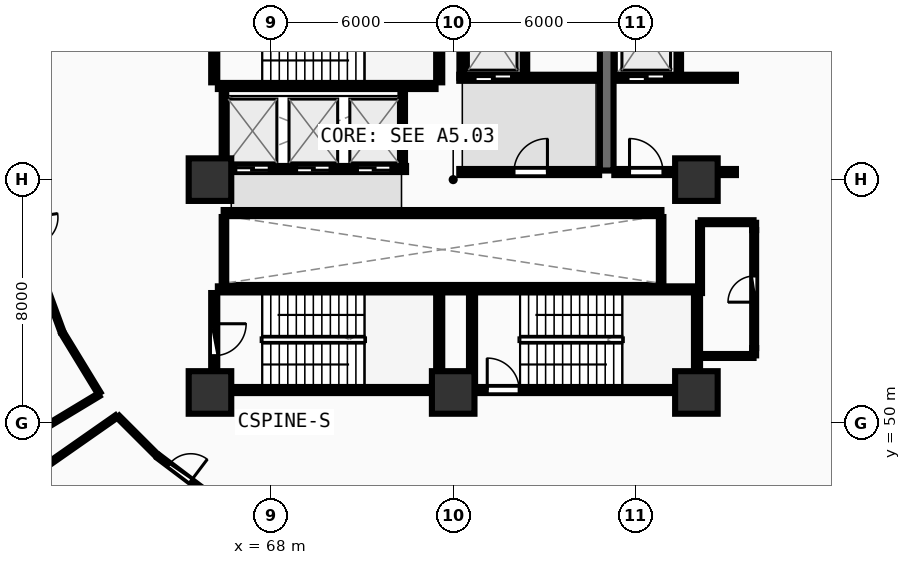
"""IFC4 building model, lengths in metres.
Left out: names, types, materials, properties, quantities, classifications, styles, units other than length and angle.
Written with IfcOpenShell. Run it as: python <this file> out.ifc"""

import sys

from ifc_helpers import new_model, si_unit, direction, frame, frame_2d, origin, origin_2d, place, context, subcontext, project, spatial, rectangle, extrude, element, fill, save


model = new_model("IFC4")
c1 = context("Model", 3, precision=1e-05, world=origin(), true_north=direction((0.0, 1.0)))
c2 = subcontext(c1, "Body", "Model", "MODEL_VIEW")
j1 = project(units=[si_unit("LENGTHUNIT", "METRE"), si_unit("PLANEANGLEUNIT", "RADIAN")], contexts=[c1])
p1 = place(None, origin())
s1 = spatial("IfcSite", under=j1, at=p1, CompositionType="ELEMENT")
p2 = place(p1, origin())
s2 = spatial("IfcBuilding", under=s1, at=p2, CompositionType="ELEMENT")
p3 = place(p2, frame((0.0, 0.0, 9.0)))
s3 = spatial("IfcBuildingStorey", under=s2, at=p3, CompositionType="ELEMENT", Elevation=9.0)
for number, where, z_axis, x_axis in (
    (1, (66.0, 51.0, 0.0), (0.0, 0.0, 1.0), (1.0, 0.0, 0.0)),
    (2, (74.0, 51.0, 0.0), (0.0, 0.0, 1.0), (1.0, 0.0, 0.0)),
    (3, (82.0, 51.0, 0.0), (0.0, 0.0, 1.0), (1.0, 0.0, 0.0)),
    (4, (82.0, 58.0, 0.0), (0.0, 0.0, 1.0), (1.0, 0.0, 0.0)),
    (5, (66.0, 58.0, 0.0), (0.0, 0.0, 1.0), (1.0, 0.0, 0.0)),
):
    element("IfcColumn", number, at=place(p3, frame(where, z_axis=z_axis, x_axis=x_axis)), inside=s3, PredefinedType="PILASTER", context=c2, shape_type="SweptSolid", body=[
        extrude(rectangle(XDim=1.4, YDim=1.4, at=origin_2d()), origin(), (0.0, 0.0, 1.0), 4.5),
    ])
p4 = place(p3, frame((66.26, 61.08, 0.0), z_axis=(0.0, 0.0, 1.0), x_axis=(1.0, 0.0, 0.0)))
e6 = element("IfcWall", 6, at=p4, inside=s3, PredefinedType="SHEAR", context=c2, shape_type="SweptSolid", body=[
    extrude(rectangle(XDim=7.16, YDim=0.2, at=frame_2d((3.58, 0.0))), origin(), (0.0, 0.0, 1.0), 4.1),
])
p5 = place(p3, frame((73.54, 61.2, 0.0), z_axis=(0.0, 0.0, 1.0), x_axis=(0.0, 1.0, 0.0)))
e7 = element("IfcWall", 7, at=p5, inside=s3, PredefinedType="SHEAR", context=c2, shape_type="SweptSolid", body=[
    extrude(rectangle(XDim=3.07, YDim=0.2, at=frame_2d((1.535, 0.0))), origin(), (0.0, 0.0, 1.0), 4.1),
])
p6 = place(p3, frame((66.14, 64.27, 0.0), z_axis=(0.0, 0.0, 1.0), x_axis=(0.0, -1.0, 0.0)))
e8 = element("IfcWall", 8, at=p6, inside=s3, PredefinedType="SHEAR", context=c2, shape_type="SweptSolid", body=[
    extrude(rectangle(XDim=3.07, YDim=0.2, at=frame_2d((1.535, 0.0))), origin(), (0.0, 0.0, 1.0), 4.1),
])
p7 = place(p6, frame((1.01, 0.0, 0.0)))
e9 = element("IfcOpeningElement", 9, at=p7, cuts=e8, PredefinedType="OPENING", context=c2, shape_type="SweptSolid", body=[
    extrude(rectangle(XDim=1.05, YDim=2.1, at=frame_2d((0.525, 1.05))), frame((0.0, 0.11, 0.0), z_axis=(0.0, -1.0, 0.0), x_axis=(1.0, 0.0, 0.0)), (0.0, 0.0, 1.0), 0.22),
])
p8 = place(p3, frame((74.0, 51.08, 0.0), z_axis=(0.0, 0.0, 1.0), x_axis=(1.0, 0.0, 0.0)))
e10 = element("IfcWall", 10, at=p8, inside=s3, PredefinedType="SHEAR", context=c2, shape_type="SweptSolid", body=[
    extrude(rectangle(XDim=7.9, YDim=0.2, at=frame_2d((3.95, 0.0))), origin(), (0.0, 0.0, 1.0), 4.1),
])
p9 = place(p8, frame((1.12, 0.0, 0.0)))
e11 = element("IfcOpeningElement", 11, at=p9, cuts=e10, PredefinedType="OPENING", context=c2, shape_type="SweptSolid", body=[
    extrude(rectangle(XDim=1.05, YDim=2.1, at=frame_2d((0.525, 1.05))), frame((0.0, 0.11, 0.0), z_axis=(0.0, -1.0, 0.0), x_axis=(1.0, 0.0, 0.0)), (0.0, 0.0, 1.0), 0.22),
])
p10 = place(p3, frame((82.02, 51.2, 0.0), z_axis=(0.0, 0.0, 1.0), x_axis=(0.0, 1.0, 0.0)))
e12 = element("IfcWall", 12, at=p10, inside=s3, PredefinedType="SHEAR", context=c2, shape_type="SweptSolid", body=[
    extrude(rectangle(XDim=3.07, YDim=0.2, at=frame_2d((1.535, 0.0))), origin(), (0.0, 0.0, 1.0), 4.1),
])
p11 = place(p3, frame((81.9, 54.39, 0.0), z_axis=(0.0, 0.0, 1.0), x_axis=(-1.0, 0.0, 0.0)))
e13 = element("IfcWall", 13, at=p11, inside=s3, PredefinedType="SHEAR", context=c2, shape_type="SweptSolid", body=[
    extrude(rectangle(XDim=8.46, YDim=0.2, at=frame_2d((4.23, 0.0))), origin(), (0.0, 0.0, 1.0), 4.1),
])
p12 = place(p3, frame((74.62, 54.27, 0.0), z_axis=(0.0, 0.0, 1.0), x_axis=(0.0, -1.0, 0.0)))
e14 = element("IfcWall", 14, at=p12, inside=s3, PredefinedType="SHEAR", context=c2, shape_type="SweptSolid", body=[
    extrude(rectangle(XDim=3.07, YDim=0.2, at=frame_2d((1.535, 0.0))), origin(), (0.0, 0.0, 1.0), 4.1),
])
p13 = place(p3, frame((66.26, 51.08, 0.0), z_axis=(0.0, 0.0, 1.0), x_axis=(1.0, 0.0, 0.0)))
e15 = element("IfcWall", 15, at=p13, inside=s3, PredefinedType="SHEAR", context=c2, shape_type="SweptSolid", body=[
    extrude(rectangle(XDim=7.16, YDim=0.2, at=frame_2d((3.58, 0.0))), origin(), (0.0, 0.0, 1.0), 4.1),
])
p14 = place(p3, frame((73.54, 51.2, 0.0), z_axis=(0.0, 0.0, 1.0), x_axis=(0.0, 1.0, 0.0)))
e16 = element("IfcWall", 16, at=p14, inside=s3, PredefinedType="SHEAR", context=c2, shape_type="SweptSolid", body=[
    extrude(rectangle(XDim=3.07, YDim=0.2, at=frame_2d((1.535, 0.0))), origin(), (0.0, 0.0, 1.0), 4.1),
])
p15 = place(p3, frame((73.42, 54.39, 0.0), z_axis=(0.0, 0.0, 1.0), x_axis=(-1.0, 0.0, 0.0)))
e17 = element("IfcWall", 17, at=p15, inside=s3, PredefinedType="SHEAR", context=c2, shape_type="SweptSolid", body=[
    extrude(rectangle(XDim=7.16, YDim=0.2, at=frame_2d((3.58, 0.0))), origin(), (0.0, 0.0, 1.0), 4.1),
])
p16 = place(p3, frame((66.14, 54.27, 0.0), z_axis=(0.0, 0.0, 1.0), x_axis=(0.0, -1.0, 0.0)))
e18 = element("IfcWall", 18, at=p16, inside=s3, PredefinedType="SHEAR", context=c2, shape_type="SweptSolid", body=[
    extrude(rectangle(XDim=3.07, YDim=0.2, at=frame_2d((1.535, 0.0))), origin(), (0.0, 0.0, 1.0), 4.1),
])
p17 = place(p16, frame((1.01, 0.0, 0.0)))
e19 = element("IfcOpeningElement", 19, at=p17, cuts=e18, PredefinedType="OPENING", context=c2, shape_type="SweptSolid", body=[
    extrude(rectangle(XDim=1.05, YDim=2.1, at=frame_2d((0.525, 1.05))), frame((0.0, 0.11, 0.0), z_axis=(0.0, -1.0, 0.0), x_axis=(1.0, 0.0, 0.0)), (0.0, 0.0, 1.0), 0.22),
])
p18 = place(p3, frame((79.05, 58.3, 0.0), z_axis=(0.0, 0.0, 1.0), x_axis=(0.0, 1.0, 0.0)))
e20 = element("IfcWall", 20, at=p18, inside=s3, PredefinedType="SHEAR", context=c2, shape_type="SweptSolid", body=[
    extrude(rectangle(XDim=6.3, YDim=0.45, at=frame_2d((3.15, 0.0))), origin(), (0.0, 0.0, 1.0), 4.1),
])
p19 = place(p3, frame((74.2, 61.35, 0.0), z_axis=(0.0, 0.0, 1.0), x_axis=(1.0, 0.0, 0.0)))
e21 = element("IfcWall", 21, at=p19, inside=s3, PredefinedType="SOLIDWALL", context=c2, shape_type="SweptSolid", body=[
    extrude(rectangle(XDim=4.6, YDim=0.2, at=frame_2d((2.3, 0.0))), origin(), (0.0, 0.0, 1.0), 4.09),
])
p20 = place(p19, frame((0.52, 0.0, 0.0)))
e22 = element("IfcOpeningElement", 22, at=p20, cuts=e21, PredefinedType="OPENING", context=c2, shape_type="SweptSolid", body=[
    extrude(rectangle(XDim=1.2, YDim=2.15, at=frame_2d((0.6, 1.075))), frame((0.0, 0.11, 0.0), z_axis=(0.0, -1.0, 0.0), x_axis=(1.0, 0.0, 0.0)), (0.0, 0.0, 1.0), 0.22),
])
p21 = place(p3, frame((74.28, 61.35, 0.0), z_axis=(0.0, 0.0, 1.0), x_axis=(0.0, 1.0, 0.0)))
e23 = element("IfcWall", 23, at=p21, inside=s3, PredefinedType="PARTITIONING", context=c2, shape_type="SweptSolid", body=[
    extrude(rectangle(XDim=2.97, YDim=0.15, at=frame_2d((1.485, 0.0))), origin(), (0.0, 0.0, 1.0), 4.09),
])
p22 = place(p3, frame((76.36, 61.48, 0.0), z_axis=(0.0, 0.0, 1.0), x_axis=(0.0, 1.0, 0.0)))
e24 = element("IfcWall", 24, at=p22, inside=s3, PredefinedType="PARTITIONING", context=c2, shape_type="SweptSolid", body=[
    extrude(rectangle(XDim=2.84, YDim=0.15, at=frame_2d((1.42, 0.0))), origin(), (0.0, 0.0, 1.0), 4.09),
])
p23 = place(p3, frame((79.3, 61.35, 0.0), z_axis=(0.0, 0.0, 1.0), x_axis=(1.0, 0.0, 0.0)))
e25 = element("IfcWall", 25, at=p23, inside=s3, PredefinedType="SOLIDWALL", context=c2, shape_type="SweptSolid", body=[
    extrude(rectangle(XDim=4.0, YDim=0.2, at=frame_2d((2.0, 0.0))), origin(), (0.0, 0.0, 1.0), 3.385),
])
p24 = place(p23, frame((0.45, 0.0, 0.0)))
e26 = element("IfcOpeningElement", 26, at=p24, cuts=e25, PredefinedType="OPENING", context=c2, shape_type="SweptSolid", body=[
    extrude(rectangle(XDim=1.2, YDim=2.15, at=frame_2d((0.6, 1.075))), frame((0.0, 0.11, 0.0), z_axis=(0.0, -1.0, 0.0), x_axis=(1.0, 0.0, 0.0)), (0.0, 0.0, 1.0), 0.22),
])
p25 = place(p3, frame((81.42, 61.48, 0.0), z_axis=(0.0, 0.0, 1.0), x_axis=(0.0, 1.0, 0.0)))
e27 = element("IfcWall", 27, at=p25, inside=s3, PredefinedType="PARTITIONING", context=c2, shape_type="SweptSolid", body=[
    extrude(rectangle(XDim=2.84, YDim=0.15, at=frame_2d((1.42, 0.0))), origin(), (0.0, 0.0, 1.0), 4.09),
])
p26 = place(p3, frame((74.2, 58.25, 0.0), z_axis=(0.0, 0.0, 1.0), x_axis=(1.0, 0.0, 0.0)))
e28 = element("IfcWall", 28, at=p26, inside=s3, PredefinedType="SOLIDWALL", context=c2, shape_type="SweptSolid", body=[
    extrude(rectangle(XDim=4.6, YDim=0.2, at=frame_2d((2.3, 0.0))), origin(), (0.0, 0.0, 1.0), 4.09),
])
p27 = place(p26, frame((1.8, 0.0, 0.0)))
e29 = element("IfcOpeningElement", 29, at=p27, cuts=e28, PredefinedType="OPENING", context=c2, shape_type="SweptSolid", body=[
    extrude(rectangle(XDim=1.1, YDim=2.1, at=frame_2d((0.55, 1.05))), frame((0.0, 0.11, 0.0), z_axis=(0.0, -1.0, 0.0), x_axis=(1.0, 0.0, 0.0)), (0.0, 0.0, 1.0), 0.22),
])
p28 = place(p3, frame((79.3, 58.25, 0.0), z_axis=(0.0, 0.0, 1.0), x_axis=(1.0, 0.0, 0.0)))
e30 = element("IfcWall", 30, at=p28, inside=s3, PredefinedType="SOLIDWALL", context=c2, shape_type="SweptSolid", body=[
    extrude(rectangle(XDim=4.0, YDim=0.2, at=frame_2d((2.0, 0.0))), origin(), (0.0, 0.0, 1.0), 3.385),
])
p29 = place(p28, frame((0.5, 0.0, 0.0)))
e31 = element("IfcOpeningElement", 31, at=p29, cuts=e30, PredefinedType="OPENING", context=c2, shape_type="SweptSolid", body=[
    extrude(rectangle(XDim=1.1, YDim=2.1, at=frame_2d((0.55, 1.05))), frame((0.0, 0.11, 0.0), z_axis=(0.0, -1.0, 0.0), x_axis=(1.0, 0.0, 0.0)), (0.0, 0.0, 1.0), 0.22),
])
p30 = place(p3, frame((66.45, 58.35, 0.0), z_axis=(0.0, 0.0, 1.0), x_axis=(1.0, 0.0, 0.0)))
e32 = element("IfcWall", 32, at=p30, inside=s3, PredefinedType="SOLIDWALL", context=c2, shape_type="SweptSolid", body=[
    extrude(rectangle(XDim=6.0, YDim=0.2, at=frame_2d((3.0, 0.0))), origin(), (0.0, 0.0, 1.0), 4.09),
])
p31 = place(p30, frame((0.4, 0.0, 0.0)))
e33 = element("IfcOpeningElement", 33, at=p31, cuts=e32, PredefinedType="OPENING", context=c2, shape_type="SweptSolid", body=[
    extrude(rectangle(XDim=1.1, YDim=2.1, at=frame_2d((0.55, 1.05))), frame((0.0, 0.11, 0.0), z_axis=(0.0, -1.0, 0.0), x_axis=(1.0, 0.0, 0.0)), (0.0, 0.0, 1.0), 0.22),
])
p32 = place(p30, frame((2.4, 0.0, 0.0)))
e34 = element("IfcOpeningElement", 34, at=p32, cuts=e32, PredefinedType="OPENING", context=c2, shape_type="SweptSolid", body=[
    extrude(rectangle(XDim=1.1, YDim=2.1, at=frame_2d((0.55, 1.05))), frame((0.0, 0.11, 0.0), z_axis=(0.0, -1.0, 0.0), x_axis=(1.0, 0.0, 0.0)), (0.0, 0.0, 1.0), 0.22),
])
p33 = place(p30, frame((4.4, 0.0, 0.0)))
e35 = element("IfcOpeningElement", 35, at=p33, cuts=e32, PredefinedType="OPENING", context=c2, shape_type="SweptSolid", body=[
    extrude(rectangle(XDim=1.1, YDim=2.1, at=frame_2d((0.55, 1.05))), frame((0.0, 0.11, 0.0), z_axis=(0.0, -1.0, 0.0), x_axis=(1.0, 0.0, 0.0)), (0.0, 0.0, 1.0), 0.22),
])
for number, where, z_axis, x_axis in (
    (36, (66.46, 58.48, 0.0), (0.0, 0.0, 1.0), (0.0, 1.0, 0.0)),
    (37, (72.34, 58.48, 0.0), (0.0, 0.0, 1.0), (0.0, 1.0, 0.0)),
):
    element("IfcWall", number, at=place(p3, frame(where, z_axis=z_axis, x_axis=x_axis)), inside=s3, PredefinedType="PARTITIONING", context=c2, shape_type="SweptSolid", body=[
        extrude(rectangle(XDim=2.46, YDim=0.15, at=frame_2d((1.23, 0.0))), origin(), (0.0, 0.0, 1.0), 4.09),
    ])
p34 = place(p3, frame((66.45, 56.9, 0.0), z_axis=(0.0, 0.0, 1.0), x_axis=(1.0, 0.0, 0.0)))
e38 = element("IfcWall", 38, at=p34, inside=s3, PredefinedType="SOLIDWALL", context=c2, shape_type="SweptSolid", body=[
    extrude(rectangle(XDim=14.4, YDim=0.2, at=frame_2d((7.2, 0.0))), origin(), (0.0, 0.0, 1.0), 4.09),
])
for number, where, z_axis, x_axis in (
    (39, (66.46, 54.48, 0.0), (0.0, 0.0, 1.0), (0.0, 1.0, 0.0)),
    (40, (80.84, 54.48, 0.0), (0.0, 0.0, 1.0), (0.0, 1.0, 0.0)),
):
    element("IfcWall", number, at=place(p3, frame(where, z_axis=z_axis, x_axis=x_axis)), inside=s3, PredefinedType="PARTITIONING", context=c2, shape_type="SweptSolid", body=[
        extrude(rectangle(XDim=2.29, YDim=0.15, at=frame_2d((1.145, 0.0))), origin(), (0.0, 0.0, 1.0), 4.09),
    ])
p35 = place(p3, frame((83.9, 52.46, 0.0), z_axis=(0.0, 0.0, 1.0), x_axis=(0.0, 1.0, 0.0)))
e41 = element("IfcWall", 41, at=p35, inside=s3, PredefinedType="PLUMBINGWALL", context=c2, shape_type="SweptSolid", body=[
    extrude(rectangle(XDim=3.88, YDim=0.13, at=frame_2d((1.94, 0.0))), origin(), (0.0, 0.0, 1.0), 4.09),
])
p36 = place(p35, frame((1.51, 0.0, 0.0)))
e42 = element("IfcOpeningElement", 42, at=p36, cuts=e41, PredefinedType="OPENING", context=c2, shape_type="SweptSolid", body=[
    extrude(rectangle(XDim=0.86, YDim=2.05, at=frame_2d((0.43, 1.025))), frame((0.0, 0.075, 0.0), z_axis=(0.0, -1.0, 0.0), x_axis=(1.0, 0.0, 0.0)), (0.0, 0.0, 1.0), 0.15),
])
p37 = place(p3, frame((64.309, 48.886, 0.0), z_axis=(0.0, 0.0, 1.0), x_axis=(0.797861385226, -0.602840949144, 0.0)))
e43 = element("IfcWall", 43, at=p37, inside=s3, PredefinedType="PARTITIONING", context=c2, shape_type="SweptSolid", body=[
    extrude(rectangle(XDim=1.758, YDim=0.12, at=frame_2d((0.879, 0.0))), origin(), (0.0, 0.0, 1.0), 3.485),
])
p38 = place(p37, frame((0.429, 0.0, 0.0)))
e44 = element("IfcOpeningElement", 44, at=p38, cuts=e43, PredefinedType="OPENING", context=c2, shape_type="SweptSolid", body=[
    extrude(rectangle(XDim=0.9, YDim=2.08, at=frame_2d((0.45, 1.04))), frame((0.0, 0.07, 0.0), z_axis=(0.0, -1.0, 0.0), x_axis=(1.0, 0.0, 0.0)), (0.0, 0.0, 1.0), 0.14),
])
p39 = place(p3, frame((82.14, 52.2, 0.0), z_axis=(0.0, 0.0, 1.0), x_axis=(1.0, 0.0, 0.0)))
e45 = element("IfcWall", 45, at=p39, inside=s3, PredefinedType="PLUMBINGWALL", context=c2, shape_type="SweptSolid", body=[
    extrude(rectangle(XDim=1.74, YDim=0.13, at=frame_2d((0.87, 0.0))), origin(), (0.0, 0.0, 1.0), 3.385),
])
for number, where, z_axis, x_axis in (
    (46, (83.9, 52.22, 0.0), (0.0, 0.0, 1.0), (0.0, 1.0, 0.0)),
    (47, (83.9, 56.34, 0.0), (0.0, 0.0, 1.0), (0.0, 1.0, 0.0)),
):
    element("IfcWall", number, at=place(p3, frame(where, z_axis=z_axis, x_axis=x_axis)), inside=s3, PredefinedType="PLUMBINGWALL", context=c2, shape_type="SweptSolid", body=[
        extrude(rectangle(XDim=0.24, YDim=0.13, at=frame_2d((0.12, 0.0))), origin(), (0.0, 0.0, 1.0), 4.09),
    ])
p40 = place(p3, frame((83.88, 56.6, 0.0), z_axis=(0.0, 0.0, 1.0), x_axis=(-1.0, 0.0, 0.0)))
e48 = element("IfcWall", 48, at=p40, inside=s3, PredefinedType="PLUMBINGWALL", context=c2, shape_type="SweptSolid", body=[
    extrude(rectangle(XDim=1.74, YDim=0.13, at=frame_2d((0.87, 0.0))), origin(), (0.0, 0.0, 1.0), 3.385),
])
p41 = place(p3, frame((82.12, 56.58, 0.0), z_axis=(0.0, 0.0, 1.0), x_axis=(0.0, -1.0, 0.0)))
e49 = element("IfcWall", 49, at=p41, inside=s3, PredefinedType="PLUMBINGWALL", context=c2, shape_type="SweptSolid", body=[
    extrude(rectangle(XDim=2.31, YDim=0.13, at=frame_2d((1.155, 0.0))), origin(), (0.0, 0.0, 1.0), 3.385),
])
p42 = place(p3, frame((87.698, 60.661, 0.0), z_axis=(0.0, 0.0, 1.0), x_axis=(-0.396638629538, 0.917974834927, 0.0)))
e50 = element("IfcWall", 50, at=p42, inside=s3, PredefinedType="PARTITIONING", context=c2, shape_type="SweptSolid", body=[
    extrude(rectangle(XDim=4.039, YDim=0.1, at=frame_2d((2.02, 0.0))), origin(), (0.0, 0.0, 1.0), 4.09),
])
p43 = place(p3, frame((60.353, 55.123, 0.0), z_axis=(0.0, 0.0, 1.0), x_axis=(0.344210122117, -0.938892641271, 0.0)))
e51 = element("IfcWall", 51, at=p43, inside=s3, PredefinedType="PARTITIONING", context=c2, shape_type="SweptSolid", body=[
    extrude(rectangle(XDim=2.256, YDim=0.1, at=frame_2d((1.128, 0.0))), origin(), (0.0, 0.0, 1.0), 4.09),
])
p44 = place(p3, frame((61.164, 52.934, 0.0), z_axis=(0.0, 0.0, 1.0), x_axis=(0.520406594215, -0.853918600745, 0.0)))
e52 = element("IfcWall", 52, at=p44, inside=s3, PredefinedType="PARTITIONING", context=c2, shape_type="SweptSolid", body=[
    extrude(rectangle(XDim=2.291, YDim=0.1, at=frame_2d((1.146, 0.0))), origin(), (0.0, 0.0, 1.0), 4.09),
])
p45 = place(p3, frame((62.343, 50.922, 0.0), z_axis=(0.0, 0.0, 1.0), x_axis=(-0.856094808971, -0.516818805824, 0.0)))
e53 = element("IfcWall", 53, at=p45, inside=s3, PredefinedType="PARTITIONING", context=c2, shape_type="SweptSolid", body=[
    extrude(rectangle(XDim=10.069, YDim=0.1, at=frame_2d((5.034, 0.0))), origin(), (0.0, 0.0, 1.0), 3.485),
])
p46 = place(p3, frame((62.98, 50.202, 0.0), z_axis=(0.0, 0.0, 1.0), x_axis=(0.707382510062, -0.706830944752, 0.0)))
e54 = element("IfcWall", 54, at=p46, inside=s3, PredefinedType="PARTITIONING", context=c2, shape_type="SweptSolid", body=[
    extrude(rectangle(XDim=1.771, YDim=0.1, at=frame_2d((0.885, 0.0))), origin(), (0.0, 0.0, 1.0), 3.485),
])
p47 = place(p3, frame((54.727, 44.478, 0.0), z_axis=(0.0, 0.0, 1.0), x_axis=(0.819486544078, 0.573098424422, 0.0)))
e55 = element("IfcWall", 55, at=p47, inside=s3, PredefinedType="PARTITIONING", context=c2, shape_type="SweptSolid", body=[
    extrude(rectangle(XDim=9.997, YDim=0.1, at=frame_2d((4.999, 0.0))), origin(), (0.0, 0.0, 1.0), 3.785),
])
p48 = place(p9, origin())
e56 = element("IfcDoor", 56, at=p48, inside=s3, OperationType="SINGLE_SWING_LEFT", PredefinedType="DOOR", context=c2, shape_type="SweptSolid", body=[
    extrude(rectangle(XDim=1.05, YDim=2.1, at=frame_2d((0.525, 1.05))), frame((0.0, 0.025, 0.0), z_axis=(0.0, -1.0, 0.0), x_axis=(1.0, 0.0, 0.0)), (0.0, 0.0, 1.0), 0.05),
])
fill(e11, e56)
p49 = place(p17, origin())
e57 = element("IfcDoor", 57, at=p49, inside=s3, OperationType="SINGLE_SWING_LEFT", PredefinedType="DOOR", context=c2, shape_type="SweptSolid", body=[
    extrude(rectangle(XDim=1.05, YDim=2.1, at=frame_2d((0.525, 1.05))), frame((0.0, 0.025, 0.0), z_axis=(0.0, -1.0, 0.0), x_axis=(1.0, 0.0, 0.0)), (0.0, 0.0, 1.0), 0.05),
])
fill(e19, e57)
p50 = place(p20, origin())
e58 = element("IfcDoor", 58, at=p50, inside=s3, OperationType="DOUBLE_DOOR_SLIDING", PredefinedType="DOOR", context=c2, shape_type="SweptSolid", body=[
    extrude(rectangle(XDim=1.2, YDim=2.15, at=frame_2d((0.6, 1.075))), frame((0.0, 0.025, 0.0), z_axis=(0.0, -1.0, 0.0), x_axis=(1.0, 0.0, 0.0)), (0.0, 0.0, 1.0), 0.05),
])
fill(e22, e58)
p51 = place(p24, origin())
e59 = element("IfcDoor", 59, at=p51, inside=s3, OperationType="DOUBLE_DOOR_SLIDING", PredefinedType="DOOR", context=c2, shape_type="SweptSolid", body=[
    extrude(rectangle(XDim=1.2, YDim=2.15, at=frame_2d((0.6, 1.075))), frame((0.0, 0.025, 0.0), z_axis=(0.0, -1.0, 0.0), x_axis=(1.0, 0.0, 0.0)), (0.0, 0.0, 1.0), 0.05),
])
fill(e26, e59)
p52 = place(p27, frame((1.1, 0.0, 0.0), z_axis=(0.0, 0.0, 1.0), x_axis=(-1.0, 0.0, 0.0)))
e60 = element("IfcDoor", 60, at=p52, inside=s3, OperationType="SINGLE_SWING_LEFT", PredefinedType="DOOR", context=c2, shape_type="SweptSolid", body=[
    extrude(rectangle(XDim=1.1, YDim=2.1, at=frame_2d((0.55, 1.05))), frame((0.0, 0.025, 0.0), z_axis=(0.0, -1.0, 0.0), x_axis=(1.0, 0.0, 0.0)), (0.0, 0.0, 1.0), 0.05),
])
fill(e29, e60)
p53 = place(p29, frame((1.1, 0.0, 0.0), z_axis=(0.0, 0.0, 1.0), x_axis=(-1.0, 0.0, 0.0)))
e61 = element("IfcDoor", 61, at=p53, inside=s3, OperationType="SINGLE_SWING_RIGHT", PredefinedType="DOOR", context=c2, shape_type="SweptSolid", body=[
    extrude(rectangle(XDim=1.1, YDim=2.1, at=frame_2d((0.55, 1.05))), frame((0.0, 0.025, 0.0), z_axis=(0.0, -1.0, 0.0), x_axis=(1.0, 0.0, 0.0)), (0.0, 0.0, 1.0), 0.05),
])
fill(e31, e61)
p54 = place(p31, origin())
e62 = element("IfcDoor", 62, at=p54, inside=s3, OperationType="DOUBLE_DOOR_SLIDING", PredefinedType="DOOR", context=c2, shape_type="SweptSolid", body=[
    extrude(rectangle(XDim=1.1, YDim=2.1, at=frame_2d((0.55, 1.05))), frame((0.0, 0.025, 0.0), z_axis=(0.0, -1.0, 0.0), x_axis=(1.0, 0.0, 0.0)), (0.0, 0.0, 1.0), 0.05),
])
fill(e33, e62)
p55 = place(p32, origin())
e63 = element("IfcDoor", 63, at=p55, inside=s3, OperationType="DOUBLE_DOOR_SLIDING", PredefinedType="DOOR", context=c2, shape_type="SweptSolid", body=[
    extrude(rectangle(XDim=1.1, YDim=2.1, at=frame_2d((0.55, 1.05))), frame((0.0, 0.025, 0.0), z_axis=(0.0, -1.0, 0.0), x_axis=(1.0, 0.0, 0.0)), (0.0, 0.0, 1.0), 0.05),
])
fill(e34, e63)
p56 = place(p33, origin())
e64 = element("IfcDoor", 64, at=p56, inside=s3, OperationType="DOUBLE_DOOR_SLIDING", PredefinedType="DOOR", context=c2, shape_type="SweptSolid", body=[
    extrude(rectangle(XDim=1.1, YDim=2.1, at=frame_2d((0.55, 1.05))), frame((0.0, 0.025, 0.0), z_axis=(0.0, -1.0, 0.0), x_axis=(1.0, 0.0, 0.0)), (0.0, 0.0, 1.0), 0.05),
])
fill(e35, e64)
p57 = place(p36, origin())
e65 = element("IfcDoor", 65, at=p57, inside=s3, OperationType="SINGLE_SWING_LEFT", PredefinedType="DOOR", context=c2, shape_type="SweptSolid", body=[
    extrude(rectangle(XDim=0.86, YDim=2.05, at=frame_2d((0.43, 1.025))), frame((0.0, 0.025, 0.0), z_axis=(0.0, -1.0, 0.0), x_axis=(1.0, 0.0, 0.0)), (0.0, 0.0, 1.0), 0.05),
])
fill(e42, e65)
p58 = place(p38, origin())
e66 = element("IfcDoor", 66, at=p58, inside=s3, OperationType="SINGLE_SWING_RIGHT", PredefinedType="DOOR", context=c2, shape_type="SweptSolid", body=[
    extrude(rectangle(XDim=0.9, YDim=2.08, at=frame_2d((0.45, 1.04))), frame((0.0, 0.025, 0.0), z_axis=(0.0, -1.0, 0.0), x_axis=(1.0, 0.0, 0.0)), (0.0, 0.0, 1.0), 0.05),
])
fill(e44, e66)
save(model, sys.argv[1])
